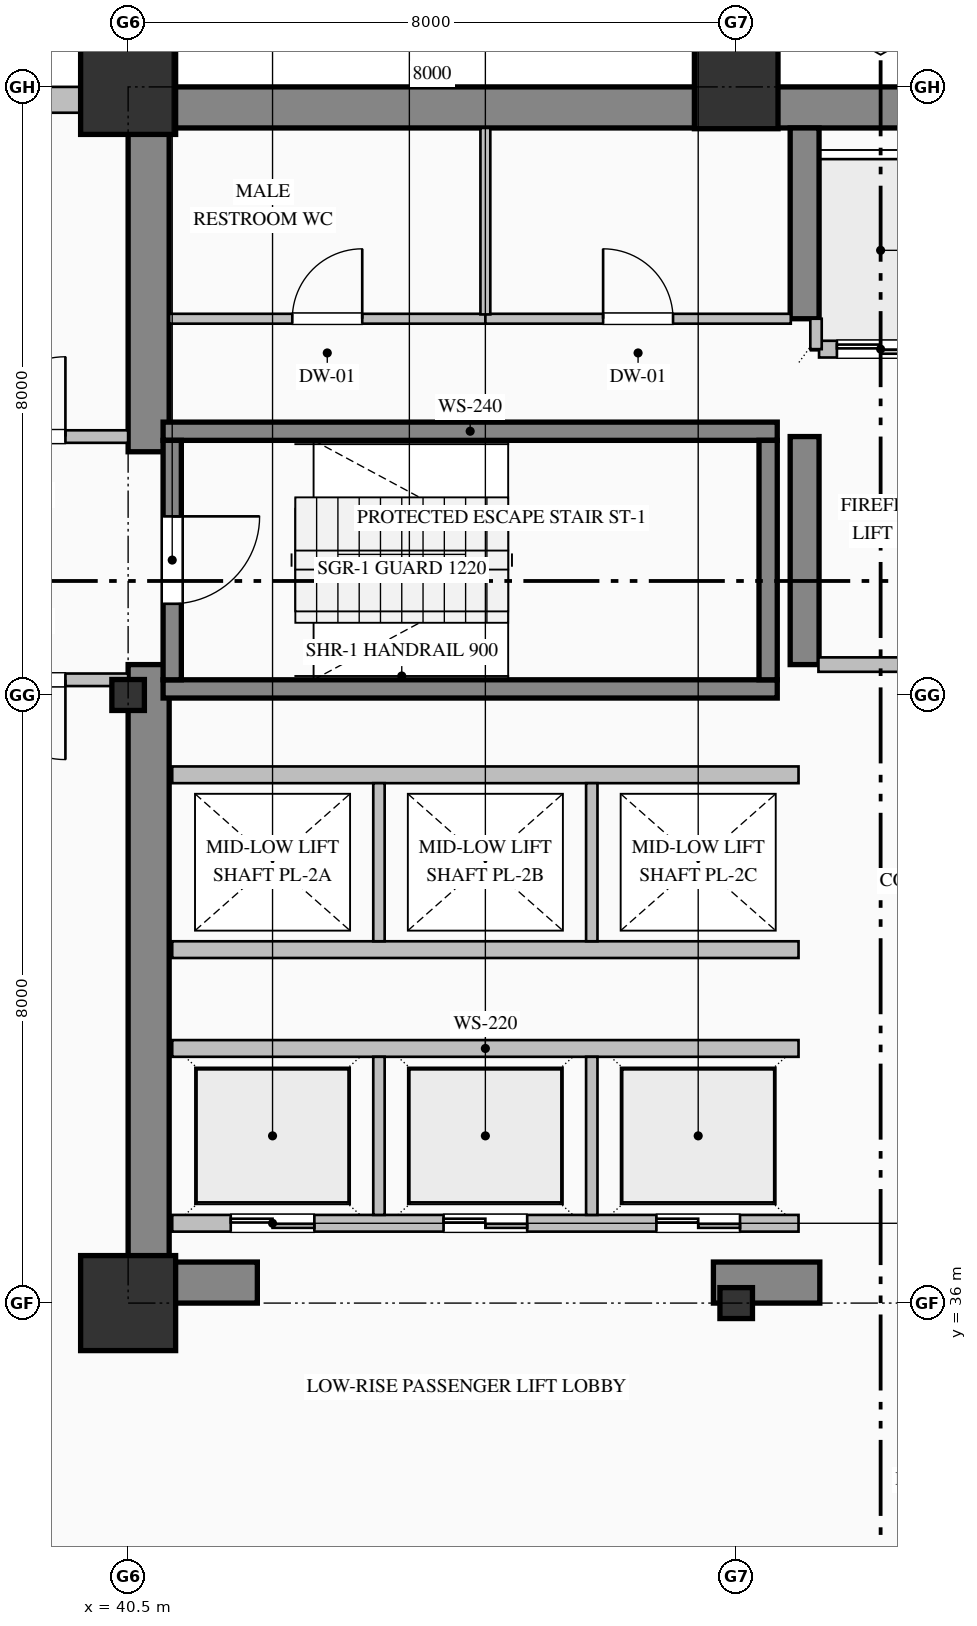
"""IFC4 building model, lengths in metres.
Left out: names, types, materials, properties, quantities, classifications, styles, units other than length and angle.
Written with IfcOpenShell. Run it as: python <this file> out.ifc"""

import sys

from ifc_helpers import new_model, si_unit, direction, frame, frame_2d, origin, origin_2d, place, context, subcontext, project, spatial, rectangle, hollow_rectangle, i_section, extrude, element, fill, save


model = new_model("IFC4")
c1 = context("Model", 3, precision=1e-05, world=origin(), true_north=direction((0.0, 1.0)))
c2 = subcontext(c1, "Body", "Model", "MODEL_VIEW")
j1 = project(units=[si_unit("LENGTHUNIT", "METRE"), si_unit("PLANEANGLEUNIT", "RADIAN")], contexts=[c1])
p1 = place(None, origin())
s1 = spatial("IfcSite", under=j1, at=p1, CompositionType="ELEMENT")
p2 = place(p1, origin())
s2 = spatial("IfcBuilding", under=s1, at=p2, CompositionType="ELEMENT")
p3 = place(p2, frame((0.0, 0.0, 52.2)))
s3 = spatial("IfcBuildingStorey", under=s2, at=p3, CompositionType="ELEMENT", Elevation=52.2)
p4 = place(p3, frame((40.5, 51.73, 0.0), z_axis=(0.0, 0.0, 1.0), x_axis=(1.0, 0.0, 0.0)))
e1 = element("IfcWall", 1, at=p4, inside=s3, PredefinedType="SHEAR", context=c2, shape_type="SweptSolid", body=[
    extrude(rectangle(XDim=23.5, YDim=0.54, at=frame_2d((11.75, 0.0))), origin(), (0.0, 0.0, 1.0), 3.75),
])
p5 = place(p3, frame((40.77, 36.54, 0.0), z_axis=(0.0, 0.0, 1.0), x_axis=(0.0, 1.0, 0.0)))
e2 = element("IfcWall", 2, at=p5, inside=s3, PredefinedType="SHEAR", context=c2, shape_type="SweptSolid", body=[
    extrude(rectangle(XDim=7.86, YDim=0.54, at=frame_2d((3.93, 0.0))), origin(), (0.0, 0.0, 1.0), 3.75),
])
p6 = place(p3, frame((40.77, 47.2, 0.0), z_axis=(0.0, 0.0, 1.0), x_axis=(0.0, 1.0, 0.0)))
e3 = element("IfcWall", 3, at=p6, inside=s3, PredefinedType="SHEAR", context=c2, shape_type="SweptSolid", body=[
    extrude(rectangle(XDim=4.26, YDim=0.54, at=frame_2d((2.13, 0.0))), origin(), (0.0, 0.0, 1.0), 3.75),
])
p7 = place(p3, frame((40.5, 36.27, 0.0), z_axis=(0.0, 0.0, 1.0), x_axis=(1.0, 0.0, 0.0)))
e4 = element("IfcWall", 4, at=p7, inside=s3, PredefinedType="SHEAR", context=c2, shape_type="SweptSolid", body=[
    extrude(rectangle(XDim=1.7, YDim=0.54, at=frame_2d((0.85, 0.0))), origin(), (0.0, 0.0, 1.0), 3.75),
])
p8 = place(p3, frame((48.2, 36.27, 0.0), z_axis=(0.0, 0.0, 1.0), x_axis=(1.0, 0.0, 0.0)))
e5 = element("IfcWall", 5, at=p8, inside=s3, PredefinedType="SHEAR", context=c2, shape_type="SweptSolid", body=[
    extrude(rectangle(XDim=1.4, YDim=0.54, at=frame_2d((0.7, 0.0))), origin(), (0.0, 0.0, 1.0), 3.75),
])
p9 = place(p3, frame((49.4, 44.4, 0.0), z_axis=(0.0, 0.0, 1.0), x_axis=(0.0, 1.0, 0.0)))
e6 = element("IfcWall", 6, at=p9, inside=s3, PredefinedType="SHEAR", context=c2, shape_type="SweptSolid", body=[
    extrude(rectangle(XDim=3.0, YDim=0.38, at=frame_2d((1.5, 0.0))), origin(), (0.0, 0.0, 1.0), 3.75),
])
p10 = place(p3, frame((49.4, 48.95, 0.0), z_axis=(0.0, 0.0, 1.0), x_axis=(0.0, 1.0, 0.0)))
e7 = element("IfcWall", 7, at=p10, inside=s3, PredefinedType="SHEAR", context=c2, shape_type="SweptSolid", body=[
    extrude(rectangle(XDim=2.51, YDim=0.38, at=frame_2d((1.255, 0.0))), origin(), (0.0, 0.0, 1.0), 3.75),
])
p11 = place(p3, frame((40.5, 36.0, 0.0), z_axis=(0.0, 0.0, 1.0), x_axis=(1.0, 0.0, 0.0)))
e8 = element("IfcColumn", 8, at=p11, inside=s3, PredefinedType="COLUMN", context=c2, shape_type="SweptSolid", body=[
    extrude(hollow_rectangle(XDim=1.25, YDim=1.25, WallThickness=0.045, at=origin_2d()), origin(), (0.0, 0.0, 1.0), 4.0),
])
p12 = place(p3, frame((40.5, 44.0, 0.0), z_axis=(0.0, 0.0, 1.0), x_axis=(1.0, 0.0, 0.0)))
e9 = element("IfcColumn", 9, at=p12, inside=s3, PredefinedType="COLUMN", context=c2, shape_type="SweptSolid", body=[
    extrude(i_section(OverallWidth=0.407, OverallDepth=0.428, WebThickness=0.02, FlangeThickness=0.035, FilletRadius=0.022, at=origin_2d()), origin(), (0.0, 0.0, 1.0), 4.0),
])
p13 = place(p3, frame((40.5, 52.0, 0.0), z_axis=(0.0, 0.0, 1.0), x_axis=(1.0, 0.0, 0.0)))
e10 = element("IfcColumn", 10, at=p13, inside=s3, PredefinedType="COLUMN", context=c2, shape_type="SweptSolid", body=[
    extrude(hollow_rectangle(XDim=1.25, YDim=1.25, WallThickness=0.045, at=origin_2d()), origin(), (0.0, 0.0, 1.0), 4.0),
])
p14 = place(p3, frame((48.5, 36.0, 0.0), z_axis=(0.0, 0.0, 1.0), x_axis=(1.0, 0.0, 0.0)))
e11 = element("IfcColumn", 11, at=p14, inside=s3, PredefinedType="COLUMN", context=c2, shape_type="SweptSolid", body=[
    extrude(i_section(OverallWidth=0.407, OverallDepth=0.428, WebThickness=0.02, FlangeThickness=0.035, FilletRadius=0.022, at=origin_2d()), origin(), (0.0, 0.0, 1.0), 4.0),
])
p15 = place(p3, frame((48.5, 52.0, 0.0), z_axis=(0.0, 0.0, 1.0), x_axis=(1.0, 0.0, 0.0)))
e12 = element("IfcColumn", 12, at=p15, inside=s3, PredefinedType="COLUMN", context=c2, shape_type="SweptSolid", body=[
    extrude(hollow_rectangle(XDim=1.1, YDim=1.1, WallThickness=0.04, at=origin_2d()), origin(), (0.0, 0.0, 1.0), 4.0),
])
p16 = place(p3, frame((4.0, 51.83, 0.0), z_axis=(0.0, 0.0, 1.0), x_axis=(1.0, 0.0, 0.0)))
e13 = element("IfcWall", 13, at=p16, inside=s3, PredefinedType="SOLIDWALL", context=c2, shape_type="SweptSolid", body=[
    extrude(rectangle(XDim=36.52, YDim=0.34, at=frame_2d((18.26, 0.0))), origin(), (0.0, 0.0, 1.0), 3.25),
])
p17 = place(p16, frame((6.3, 0.0, 0.85)))
e14 = element("IfcOpeningElement", 14, at=p17, cuts=e13, PredefinedType="OPENING", context=c2, shape_type="SweptSolid", body=[
    extrude(rectangle(XDim=1.8, YDim=2.05, at=frame_2d((0.9, 1.025))), frame((0.0, 0.18, 0.0), z_axis=(0.0, -1.0, 0.0), x_axis=(1.0, 0.0, 0.0)), (0.0, 0.0, 1.0), 0.36),
])
p18 = place(p16, frame((17.1, 0.0, 0.85)))
e15 = element("IfcOpeningElement", 15, at=p18, cuts=e13, PredefinedType="OPENING", context=c2, shape_type="SweptSolid", body=[
    extrude(rectangle(XDim=1.8, YDim=2.05, at=frame_2d((0.9, 1.025))), frame((0.0, 0.18, 0.0), z_axis=(0.0, -1.0, 0.0), x_axis=(1.0, 0.0, 0.0)), (0.0, 0.0, 1.0), 0.36),
])
p19 = place(p16, frame((24.0, 0.0, 0.8)))
e16 = element("IfcOpeningElement", 16, at=p19, cuts=e13, PredefinedType="OPENING", context=c2, shape_type="SweptSolid", body=[
    extrude(rectangle(XDim=2.4, YDim=2.15, at=frame_2d((1.2, 1.075))), frame((0.0, 0.18, 0.0), z_axis=(0.0, -1.0, 0.0), x_axis=(1.0, 0.0, 0.0)), (0.0, 0.0, 1.0), 0.36),
])
for number, where, z_axis, x_axis in (
    (17, (40.96, 47.47, 0.0), (0.0, 0.0, 1.0), (1.0, 0.0, 0.0)),
    (18, (49.04, 44.08, 0.0), (0.0, 0.0, 1.0), (-1.0, 0.0, 0.0)),
):
    element("IfcWall", number, at=place(p3, frame(where, z_axis=z_axis, x_axis=x_axis)), inside=s3, PredefinedType="SOLIDWALL", context=c2, shape_type="SweptSolid", body=[
        extrude(rectangle(XDim=8.08, YDim=0.24, at=frame_2d((4.04, 0.0))), origin(), (0.0, 0.0, 1.0), 4.0),
    ])
p20 = place(p3, frame((41.08, 47.35, 0.0), z_axis=(0.0, 0.0, 1.0), x_axis=(0.0, -1.0, 0.0)))
e19 = element("IfcWall", 19, at=p20, inside=s3, PredefinedType="SOLIDWALL", context=c2, shape_type="SweptSolid", body=[
    extrude(rectangle(XDim=3.15, YDim=0.24, at=frame_2d((1.575, 0.0))), origin(), (0.0, 0.0, 1.0), 4.0),
])
p21 = place(p20, frame((1.0, 0.0, 0.0)))
e20 = element("IfcOpeningElement", 20, at=p21, cuts=e19, PredefinedType="OPENING", context=c2, shape_type="SweptSolid", body=[
    extrude(rectangle(XDim=1.15, YDim=2.2, at=frame_2d((0.575, 1.1))), frame((0.0, 0.13, 0.0), z_axis=(0.0, -1.0, 0.0), x_axis=(1.0, 0.0, 0.0)), (0.0, 0.0, 1.0), 0.26),
])
p22 = place(p3, frame((48.92, 44.2, 0.0), z_axis=(0.0, 0.0, 1.0), x_axis=(0.0, 1.0, 0.0)))
e21 = element("IfcWall", 21, at=p22, inside=s3, PredefinedType="SOLIDWALL", context=c2, shape_type="SweptSolid", body=[
    extrude(rectangle(XDim=3.15, YDim=0.24, at=frame_2d((1.575, 0.0))), origin(), (0.0, 0.0, 1.0), 4.0),
])
p23 = place(p3, frame((54.71, 48.55, 0.0), z_axis=(0.0, 0.0, 1.0), x_axis=(-1.0, 0.0, 0.0)))
e22 = element("IfcWall", 22, at=p23, inside=s3, PredefinedType="PARTITIONING", context=c2, shape_type="SweptSolid", body=[
    extrude(rectangle(XDim=5.12, YDim=0.22, at=frame_2d((2.56, 0.0))), origin(), (0.0, 0.0, 1.0), 3.75),
])
p24 = place(p23, frame((3.735, 0.0, 0.0)))
e23 = element("IfcOpeningElement", 23, at=p24, cuts=e22, PredefinedType="OPENING", context=c2, shape_type="SweptSolid", body=[
    extrude(rectangle(XDim=1.15, YDim=2.2, at=frame_2d((0.575, 1.1))), frame((0.0, 0.12, 0.0), z_axis=(0.0, -1.0, 0.0), x_axis=(1.0, 0.0, 0.0)), (0.0, 0.0, 1.0), 0.24),
])
p25 = place(p23, frame((0.935, 0.0, 0.0)))
e24 = element("IfcOpeningElement", 24, at=p25, cuts=e22, PredefinedType="OPENING", context=c2, shape_type="SweptSolid", body=[
    extrude(rectangle(XDim=1.15, YDim=2.2, at=frame_2d((0.575, 1.1))), frame((0.0, 0.12, 0.0), z_axis=(0.0, -1.0, 0.0), x_axis=(1.0, 0.0, 0.0)), (0.0, 0.0, 1.0), 0.24),
])
p26 = place(p3, frame((49.55, 48.55, 0.0), z_axis=(0.0, 0.0, 1.0), x_axis=(0.0, 1.0, 0.0)))
e25 = element("IfcWall", 25, at=p26, inside=s3, PredefinedType="PARTITIONING", context=c2, shape_type="SweptSolid", body=[
    extrude(rectangle(XDim=0.4, YDim=0.15, at=frame_2d((0.2, 0.0))), origin(), (0.0, 0.0, 1.0), 3.75),
])
p27 = place(p3, frame((49.32, 37.05, 0.0), z_axis=(0.0, 0.0, 1.0), x_axis=(-1.0, 0.0, 0.0)))
e26 = element("IfcWall", 26, at=p27, inside=s3, PredefinedType="PARTITIONING", context=c2, shape_type="SweptSolid", body=[
    extrude(rectangle(XDim=8.24, YDim=0.22, at=frame_2d((4.12, 0.0))), origin(), (0.0, 0.0, 1.0), 3.75),
])
p28 = place(p27, frame((6.37, 0.0, 0.0)))
e27 = element("IfcOpeningElement", 27, at=p28, cuts=e26, PredefinedType="OPENING", context=c2, shape_type="SweptSolid", body=[
    extrude(rectangle(XDim=1.1, YDim=2.2, at=frame_2d((0.55, 1.1))), frame((0.0, 0.12, 0.0), z_axis=(0.0, -1.0, 0.0), x_axis=(1.0, 0.0, 0.0)), (0.0, 0.0, 1.0), 0.24),
])
p29 = place(p27, frame((3.57, 0.0, 0.0)))
e28 = element("IfcOpeningElement", 28, at=p29, cuts=e26, PredefinedType="OPENING", context=c2, shape_type="SweptSolid", body=[
    extrude(rectangle(XDim=1.1, YDim=2.2, at=frame_2d((0.55, 1.1))), frame((0.0, 0.12, 0.0), z_axis=(0.0, -1.0, 0.0), x_axis=(1.0, 0.0, 0.0)), (0.0, 0.0, 1.0), 0.24),
])
p30 = place(p27, frame((0.77, 0.0, 0.0)))
e29 = element("IfcOpeningElement", 29, at=p30, cuts=e26, PredefinedType="OPENING", context=c2, shape_type="SweptSolid", body=[
    extrude(rectangle(XDim=1.1, YDim=2.2, at=frame_2d((0.55, 1.1))), frame((0.0, 0.12, 0.0), z_axis=(0.0, -1.0, 0.0), x_axis=(1.0, 0.0, 0.0)), (0.0, 0.0, 1.0), 0.24),
])
p31 = place(p3, frame((41.08, 39.35, 0.0), z_axis=(0.0, 0.0, 1.0), x_axis=(1.0, 0.0, 0.0)))
e30 = element("IfcWall", 30, at=p31, inside=s3, PredefinedType="PARTITIONING", context=c2, shape_type="SweptSolid", body=[
    extrude(rectangle(XDim=8.24, YDim=0.22, at=frame_2d((4.12, 0.0))), origin(), (0.0, 0.0, 1.0), 3.75),
])
for number, where, z_axis, x_axis in (
    (31, (43.8, 37.16, 0.0), (0.0, 0.0, 1.0), (0.0, 1.0, 0.0)),
    (32, (46.6, 37.16, 0.0), (0.0, 0.0, 1.0), (0.0, 1.0, 0.0)),
):
    element("IfcWall", number, at=place(p3, frame(where, z_axis=z_axis, x_axis=x_axis)), inside=s3, PredefinedType="PARTITIONING", context=c2, shape_type="SweptSolid", body=[
        extrude(rectangle(XDim=2.08, YDim=0.15, at=frame_2d((1.04, 0.0))), origin(), (0.0, 0.0, 1.0), 3.75),
    ])
for number, where, z_axis, x_axis in (
    (33, (49.32, 40.65, 0.0), (0.0, 0.0, 1.0), (-1.0, 0.0, 0.0)),
    (34, (41.08, 42.95, 0.0), (0.0, 0.0, 1.0), (1.0, 0.0, 0.0)),
):
    element("IfcWall", number, at=place(p3, frame(where, z_axis=z_axis, x_axis=x_axis)), inside=s3, PredefinedType="PARTITIONING", context=c2, shape_type="SweptSolid", body=[
        extrude(rectangle(XDim=8.24, YDim=0.22, at=frame_2d((4.12, 0.0))), origin(), (0.0, 0.0, 1.0), 3.75),
    ])
for number, where, z_axis, x_axis in (
    (35, (43.8, 40.76, 0.0), (0.0, 0.0, 1.0), (0.0, 1.0, 0.0)),
    (36, (46.6, 40.76, 0.0), (0.0, 0.0, 1.0), (0.0, 1.0, 0.0)),
):
    element("IfcWall", number, at=place(p3, frame(where, z_axis=z_axis, x_axis=x_axis)), inside=s3, PredefinedType="PARTITIONING", context=c2, shape_type="SweptSolid", body=[
        extrude(rectangle(XDim=2.08, YDim=0.15, at=frame_2d((1.04, 0.0))), origin(), (0.0, 0.0, 1.0), 3.75),
    ])
p32 = place(p3, frame((37.8, 47.4, 0.0), z_axis=(0.0, 0.0, 1.0), x_axis=(1.0, 0.0, 0.0)))
e37 = element("IfcWall", 37, at=p32, inside=s3, PredefinedType="PARTITIONING", context=c2, shape_type="SweptSolid", body=[
    extrude(rectangle(XDim=2.7, YDim=0.165, at=frame_2d((1.35, 0.0))), origin(), (0.0, 0.0, 1.0), 3.75),
])
p33 = place(p32, frame((0.825, 0.0, 0.0)))
e38 = element("IfcOpeningElement", 38, at=p33, cuts=e37, PredefinedType="OPENING", context=c2, shape_type="SweptSolid", body=[
    extrude(rectangle(XDim=1.05, YDim=2.15, at=frame_2d((0.525, 1.075))), frame((0.0, 0.093, 0.0), z_axis=(0.0, -1.0, 0.0), x_axis=(1.0, 0.0, 0.0)), (0.0, 0.0, 1.0), 0.185),
])
p34 = place(p3, frame((40.5, 44.2, 0.0), z_axis=(0.0, 0.0, 1.0), x_axis=(-1.0, 0.0, 0.0)))
e39 = element("IfcWall", 39, at=p34, inside=s3, PredefinedType="PARTITIONING", context=c2, shape_type="SweptSolid", body=[
    extrude(rectangle(XDim=2.7, YDim=0.165, at=frame_2d((1.35, 0.0))), origin(), (0.0, 0.0, 1.0), 3.75),
])
p35 = place(p34, frame((0.825, 0.0, 0.0)))
e40 = element("IfcOpeningElement", 40, at=p35, cuts=e39, PredefinedType="OPENING", context=c2, shape_type="SweptSolid", body=[
    extrude(rectangle(XDim=1.05, YDim=2.15, at=frame_2d((0.525, 1.075))), frame((0.0, 0.093, 0.0), z_axis=(0.0, -1.0, 0.0), x_axis=(1.0, 0.0, 0.0)), (0.0, 0.0, 1.0), 0.185),
])
p36 = place(p3, frame((41.04, 48.95, 0.0), z_axis=(0.0, 0.0, 1.0), x_axis=(1.0, 0.0, 0.0)))
e41 = element("IfcWall", 41, at=p36, inside=s3, PredefinedType="PARTITIONING", context=c2, shape_type="SweptSolid", body=[
    extrude(rectangle(XDim=4.16, YDim=0.13, at=frame_2d((2.08, 0.0))), origin(), (0.0, 0.0, 1.0), 3.75),
])
p37 = place(p36, frame((1.62, 0.0, 0.0)))
e42 = element("IfcOpeningElement", 42, at=p37, cuts=e41, PredefinedType="OPENING", context=c2, shape_type="SweptSolid", body=[
    extrude(rectangle(XDim=0.92, YDim=2.15, at=frame_2d((0.46, 1.075))), frame((0.0, 0.075, 0.0), z_axis=(0.0, -1.0, 0.0), x_axis=(1.0, 0.0, 0.0)), (0.0, 0.0, 1.0), 0.15),
])
p38 = place(p3, frame((45.2, 48.95, 0.0), z_axis=(0.0, 0.0, 1.0), x_axis=(1.0, 0.0, 0.0)))
e43 = element("IfcWall", 43, at=p38, inside=s3, PredefinedType="PARTITIONING", context=c2, shape_type="SweptSolid", body=[
    extrude(rectangle(XDim=4.018, YDim=0.13, at=frame_2d((2.009, 0.0))), origin(), (0.0, 0.0, 1.0), 3.75),
])
p39 = place(p38, frame((1.549, 0.0, 0.0)))
e44 = element("IfcOpeningElement", 44, at=p39, cuts=e43, PredefinedType="OPENING", context=c2, shape_type="SweptSolid", body=[
    extrude(rectangle(XDim=0.92, YDim=2.15, at=frame_2d((0.46, 1.075))), frame((0.0, 0.075, 0.0), z_axis=(0.0, -1.0, 0.0), x_axis=(1.0, 0.0, 0.0)), (0.0, 0.0, 1.0), 0.15),
])
p40 = place(p3, frame((54.718, 44.4, 0.0), z_axis=(0.0, 0.0, 1.0), x_axis=(-1.0, 0.0, 0.0)))
e45 = element("IfcWall", 45, at=p40, inside=s3, PredefinedType="PARTITIONING", context=c2, shape_type="SweptSolid", body=[
    extrude(rectangle(XDim=5.136, YDim=0.19, at=frame_2d((2.568, 0.0))), origin(), (0.0, 0.0, 1.0), 3.75),
])
p41 = place(p40, frame((2.043, 0.0, 0.0)))
e46 = element("IfcOpeningElement", 46, at=p41, cuts=e45, PredefinedType="OPENING", context=c2, shape_type="SweptSolid", body=[
    extrude(rectangle(XDim=1.05, YDim=2.15, at=frame_2d((0.525, 1.075))), frame((0.0, 0.105, 0.0), z_axis=(0.0, -1.0, 0.0), x_axis=(1.0, 0.0, 0.0)), (0.0, 0.0, 1.0), 0.21),
])
p42 = place(p3, frame((45.2, 51.46, 0.0), z_axis=(0.0, 0.0, 1.0), x_axis=(0.0, -1.0, 0.0)))
e47 = element("IfcWall", 47, at=p42, inside=s3, PredefinedType="PARTITIONING", context=c2, shape_type="SweptSolid", body=[
    extrude(rectangle(XDim=2.453, YDim=0.13, at=frame_2d((1.227, 0.0))), origin(), (0.0, 0.0, 1.0), 3.75),
])
p43 = place(p21, origin())
e48 = element("IfcDoor", 48, at=p43, inside=s3, OperationType="SINGLE_SWING_LEFT", PredefinedType="DOOR", context=c2, shape_type="SweptSolid", body=[
    extrude(rectangle(XDim=1.15, YDim=2.2, at=frame_2d((0.575, 1.1))), frame((0.0, 0.025, 0.0), z_axis=(0.0, -1.0, 0.0), x_axis=(1.0, 0.0, 0.0)), (0.0, 0.0, 1.0), 0.05),
])
fill(e20, e48)
p44 = place(p24, origin())
e49 = element("IfcDoor", 49, at=p44, inside=s3, OperationType="DOUBLE_DOOR_SLIDING", PredefinedType="DOOR", context=c2, shape_type="SweptSolid", body=[
    extrude(rectangle(XDim=1.15, YDim=2.2, at=frame_2d((0.575, 1.1))), frame((0.0, 0.025, 0.0), z_axis=(0.0, -1.0, 0.0), x_axis=(1.0, 0.0, 0.0)), (0.0, 0.0, 1.0), 0.05),
])
fill(e23, e49)
p45 = place(p28, origin())
e50 = element("IfcDoor", 50, at=p45, inside=s3, OperationType="DOUBLE_DOOR_SLIDING", PredefinedType="DOOR", context=c2, shape_type="SweptSolid", body=[
    extrude(rectangle(XDim=1.1, YDim=2.2, at=frame_2d((0.55, 1.1))), frame((0.0, 0.025, 0.0), z_axis=(0.0, -1.0, 0.0), x_axis=(1.0, 0.0, 0.0)), (0.0, 0.0, 1.0), 0.05),
])
fill(e27, e50)
p46 = place(p29, origin())
e51 = element("IfcDoor", 51, at=p46, inside=s3, OperationType="DOUBLE_DOOR_SLIDING", PredefinedType="DOOR", context=c2, shape_type="SweptSolid", body=[
    extrude(rectangle(XDim=1.1, YDim=2.2, at=frame_2d((0.55, 1.1))), frame((0.0, 0.025, 0.0), z_axis=(0.0, -1.0, 0.0), x_axis=(1.0, 0.0, 0.0)), (0.0, 0.0, 1.0), 0.05),
])
fill(e28, e51)
p47 = place(p30, origin())
e52 = element("IfcDoor", 52, at=p47, inside=s3, OperationType="DOUBLE_DOOR_SLIDING", PredefinedType="DOOR", context=c2, shape_type="SweptSolid", body=[
    extrude(rectangle(XDim=1.1, YDim=2.2, at=frame_2d((0.55, 1.1))), frame((0.0, 0.025, 0.0), z_axis=(0.0, -1.0, 0.0), x_axis=(1.0, 0.0, 0.0)), (0.0, 0.0, 1.0), 0.05),
])
fill(e29, e52)
p48 = place(p33, origin())
e53 = element("IfcDoor", 53, at=p48, inside=s3, OperationType="SINGLE_SWING_RIGHT", PredefinedType="DOOR", context=c2, shape_type="SweptSolid", body=[
    extrude(rectangle(XDim=1.05, YDim=2.15, at=frame_2d((0.525, 1.075))), frame((0.0, 0.025, 0.0), z_axis=(0.0, -1.0, 0.0), x_axis=(1.0, 0.0, 0.0)), (0.0, 0.0, 1.0), 0.05),
])
fill(e38, e53)
p49 = place(p35, origin())
e54 = element("IfcDoor", 54, at=p49, inside=s3, OperationType="SINGLE_SWING_LEFT", PredefinedType="DOOR", context=c2, shape_type="SweptSolid", body=[
    extrude(rectangle(XDim=1.05, YDim=2.15, at=frame_2d((0.525, 1.075))), frame((0.0, 0.025, 0.0), z_axis=(0.0, -1.0, 0.0), x_axis=(1.0, 0.0, 0.0)), (0.0, 0.0, 1.0), 0.05),
])
fill(e40, e54)
p50 = place(p37, origin())
e55 = element("IfcDoor", 55, at=p50, inside=s3, OperationType="SINGLE_SWING_RIGHT", PredefinedType="DOOR", context=c2, shape_type="SweptSolid", body=[
    extrude(rectangle(XDim=0.92, YDim=2.15, at=frame_2d((0.46, 1.075))), frame((0.0, 0.025, 0.0), z_axis=(0.0, -1.0, 0.0), x_axis=(1.0, 0.0, 0.0)), (0.0, 0.0, 1.0), 0.05),
])
fill(e42, e55)
p51 = place(p39, origin())
e56 = element("IfcDoor", 56, at=p51, inside=s3, OperationType="SINGLE_SWING_LEFT", PredefinedType="DOOR", context=c2, shape_type="SweptSolid", body=[
    extrude(rectangle(XDim=0.92, YDim=2.15, at=frame_2d((0.46, 1.075))), frame((0.0, 0.025, 0.0), z_axis=(0.0, -1.0, 0.0), x_axis=(1.0, 0.0, 0.0)), (0.0, 0.0, 1.0), 0.05),
])
fill(e44, e56)
save(model, sys.argv[1])
